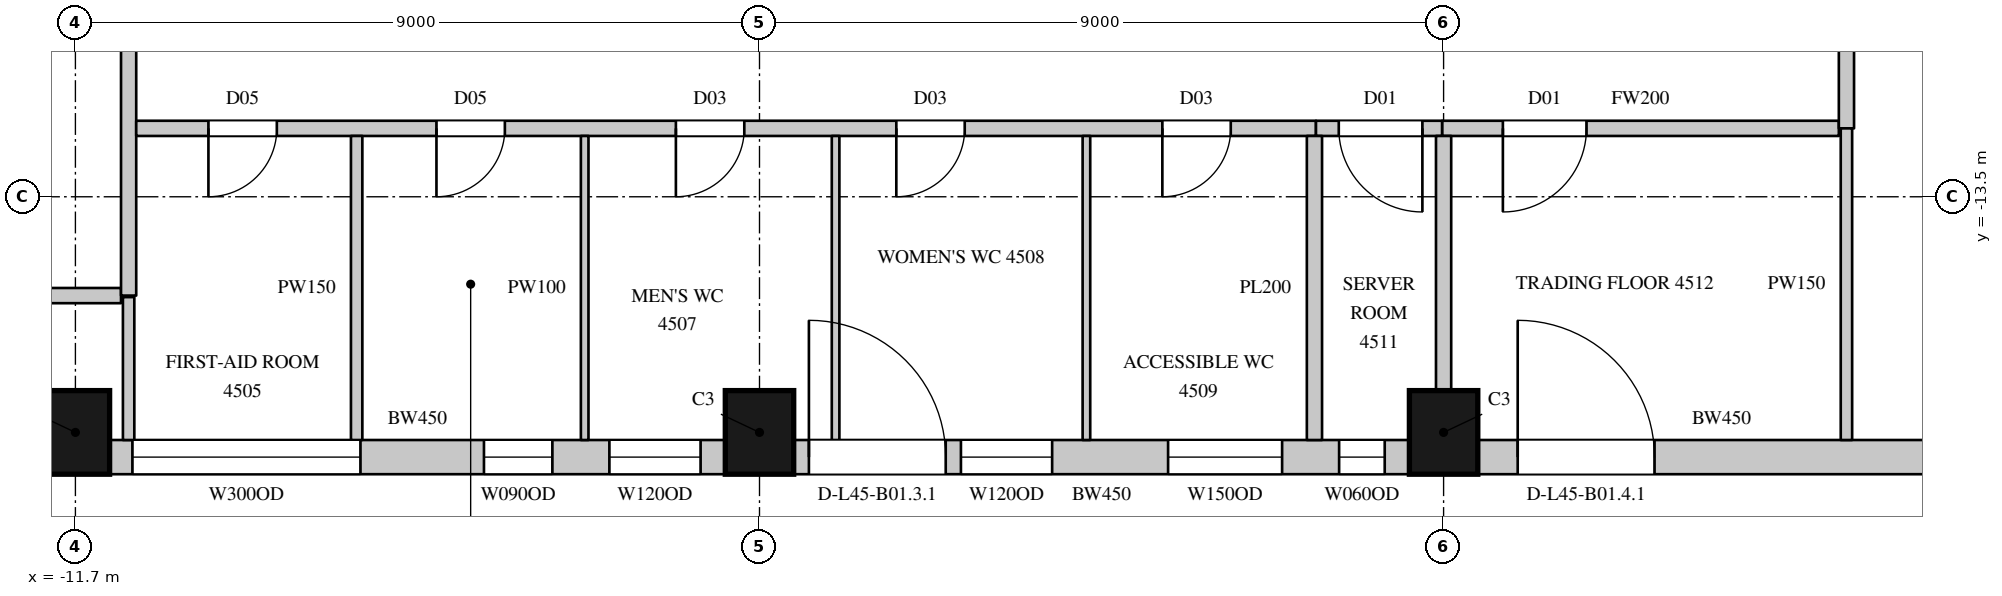
"""IFC4 building model, lengths in metres.
Left out: names, types, materials, properties, quantities, classifications, styles, units other than length and angle.
Written with IfcOpenShell. Run it as: python <this file> out.ifc"""

import sys

from ifc_helpers import new_model, si_unit, direction, frame, frame_2d, origin, origin_2d, place, context, subcontext, project, spatial, rectangle, extrude, element, fill, save


model = new_model("IFC4")
c1 = context("Model", 3, precision=1e-05, world=origin(), true_north=direction((0.0, 1.0)))
c2 = subcontext(c1, "Body", "Model", "MODEL_VIEW")
j1 = project(units=[si_unit("LENGTHUNIT", "METRE"), si_unit("PLANEANGLEUNIT", "RADIAN")], contexts=[c1])
p1 = place(None, origin())
s1 = spatial("IfcSite", under=j1, at=p1, CompositionType="ELEMENT")
p2 = place(p1, origin())
s2 = spatial("IfcBuilding", under=s1, at=p2, CompositionType="ELEMENT")
p3 = place(p2, frame((0.0, 0.0, 205.6)))
s3 = spatial("IfcBuildingStorey", under=s2, at=p3, CompositionType="ELEMENT", Elevation=205.6)
for number, where, z_axis, x_axis in (
    (1, (-11.7, -16.6, 0.0), (0.0, 0.0, 1.0), (1.0, 0.0, 0.0)),
    (2, (-2.7, -16.6, 0.0), (0.0, 0.0, 1.0), (1.0, 0.0, 0.0)),
    (3, (6.3, -16.6, 0.0), (0.0, 0.0, 1.0), (1.0, 0.0, 0.0)),
):
    element("IfcColumn", number, at=place(p3, frame(where, z_axis=z_axis, x_axis=x_axis)), inside=s3, PredefinedType="COLUMN", context=c2, shape_type="SweptSolid", body=[
        extrude(rectangle(XDim=0.9, YDim=1.1, at=origin_2d()), origin(), (0.0, 0.0, 1.0), 4.1),
    ])
p4 = place(p3, frame((-11.25, -16.925, 0.0), z_axis=(0.0, 0.0, 1.0), x_axis=(1.0, 0.0, 0.0)))
e4 = element("IfcWall", 4, at=p4, inside=s3, PredefinedType="SOLIDWALL", context=c2, shape_type="SweptSolid", body=[
    extrude(rectangle(XDim=8.1, YDim=0.45, at=frame_2d((4.05, 0.0))), origin(), (0.0, 0.0, 1.0), 3.8),
])
p5 = place(p4, frame((0.3, 0.0, 1.05)))
e5 = element("IfcOpeningElement", 5, at=p5, cuts=e4, PredefinedType="OPENING", context=c2, shape_type="SweptSolid", body=[
    extrude(rectangle(XDim=3.0, YDim=2.4, at=frame_2d((1.5, 1.2))), frame((0.0, 0.235, 0.0), z_axis=(0.0, -1.0, 0.0), x_axis=(1.0, 0.0, 0.0)), (0.0, 0.0, 1.0), 0.47),
])
p6 = place(p4, frame((4.925, 0.0, 1.05)))
e6 = element("IfcOpeningElement", 6, at=p6, cuts=e4, PredefinedType="OPENING", context=c2, shape_type="SweptSolid", body=[
    extrude(rectangle(XDim=0.9, YDim=2.4, at=frame_2d((0.45, 1.2))), frame((0.0, 0.235, 0.0), z_axis=(0.0, -1.0, 0.0), x_axis=(1.0, 0.0, 0.0)), (0.0, 0.0, 1.0), 0.47),
])
p7 = place(p4, frame((6.575, 0.0, 1.05)))
e7 = element("IfcOpeningElement", 7, at=p7, cuts=e4, PredefinedType="OPENING", context=c2, shape_type="SweptSolid", body=[
    extrude(rectangle(XDim=1.2, YDim=2.4, at=frame_2d((0.6, 1.2))), frame((0.0, 0.235, 0.0), z_axis=(0.0, -1.0, 0.0), x_axis=(1.0, 0.0, 0.0)), (0.0, 0.0, 1.0), 0.47),
])
p8 = place(p3, frame((-2.25, -16.925, 0.0), z_axis=(0.0, 0.0, 1.0), x_axis=(1.0, 0.0, 0.0)))
e8 = element("IfcWall", 8, at=p8, inside=s3, PredefinedType="SOLIDWALL", context=c2, shape_type="SweptSolid", body=[
    extrude(rectangle(XDim=8.1, YDim=0.45, at=frame_2d((4.05, 0.0))), origin(), (0.0, 0.0, 1.0), 3.8),
])
p9 = place(p8, frame((0.2, 0.0, 0.0)))
e9 = element("IfcOpeningElement", 9, at=p9, cuts=e8, PredefinedType="OPENING", context=c2, shape_type="SweptSolid", body=[
    extrude(rectangle(XDim=1.8, YDim=2.4, at=frame_2d((0.9, 1.2))), frame((0.0, 0.235, 0.0), z_axis=(0.0, -1.0, 0.0), x_axis=(1.0, 0.0, 0.0)), (0.0, 0.0, 1.0), 0.47),
])
p10 = place(p8, frame((2.2, 0.0, 1.05)))
e10 = element("IfcOpeningElement", 10, at=p10, cuts=e8, PredefinedType="OPENING", context=c2, shape_type="SweptSolid", body=[
    extrude(rectangle(XDim=1.2, YDim=2.4, at=frame_2d((0.6, 1.2))), frame((0.0, 0.235, 0.0), z_axis=(0.0, -1.0, 0.0), x_axis=(1.0, 0.0, 0.0)), (0.0, 0.0, 1.0), 0.47),
])
p11 = place(p8, frame((4.926, 0.0, 1.05)))
e11 = element("IfcOpeningElement", 11, at=p11, cuts=e8, PredefinedType="OPENING", context=c2, shape_type="SweptSolid", body=[
    extrude(rectangle(XDim=1.5, YDim=2.4, at=frame_2d((0.75, 1.2))), frame((0.0, 0.235, 0.0), z_axis=(0.0, -1.0, 0.0), x_axis=(1.0, 0.0, 0.0)), (0.0, 0.0, 1.0), 0.47),
])
p12 = place(p8, frame((7.176, 0.0, 1.05)))
e12 = element("IfcOpeningElement", 12, at=p12, cuts=e8, PredefinedType="OPENING", context=c2, shape_type="SweptSolid", body=[
    extrude(rectangle(XDim=0.6, YDim=2.4, at=frame_2d((0.3, 1.2))), frame((0.0, 0.235, 0.0), z_axis=(0.0, -1.0, 0.0), x_axis=(1.0, 0.0, 0.0)), (0.0, 0.0, 1.0), 0.47),
])
p13 = place(p3, frame((6.75, -16.925, 0.0), z_axis=(0.0, 0.0, 1.0), x_axis=(1.0, 0.0, 0.0)))
e13 = element("IfcWall", 13, at=p13, inside=s3, PredefinedType="SOLIDWALL", context=c2, shape_type="SweptSolid", body=[
    extrude(rectangle(XDim=6.414, YDim=0.45, at=frame_2d((3.207, 0.0))), origin(), (0.0, 0.0, 1.0), 3.8),
])
p14 = place(p13, frame((0.525, 0.0, 0.0)))
e14 = element("IfcOpeningElement", 14, at=p14, cuts=e13, PredefinedType="OPENING", context=c2, shape_type="SweptSolid", body=[
    extrude(rectangle(XDim=1.8, YDim=2.4, at=frame_2d((0.9, 1.2))), frame((0.0, 0.235, 0.0), z_axis=(0.0, -1.0, 0.0), x_axis=(1.0, 0.0, 0.0)), (0.0, 0.0, 1.0), 0.47),
])
p15 = place(p3, frame((-13.97, -14.8, 0.0), z_axis=(0.0, 0.0, 1.0), x_axis=(1.0, 0.0, 0.0)))
e15 = element("IfcWall", 15, at=p15, inside=s3, PredefinedType="PARTITIONING", context=c2, shape_type="SweptSolid", body=[
    extrude(rectangle(XDim=2.87, YDim=0.2, at=frame_2d((1.435, 0.0))), origin(), (0.0, 0.0, 1.0), 3.8),
])
p16 = place(p3, frame((-11.0, -14.8, 0.0), z_axis=(0.0, 0.0, 1.0), x_axis=(0.0, 1.0, 0.0)))
e16 = element("IfcWall", 16, at=p16, inside=s3, PredefinedType="PARTITIONING", context=c2, shape_type="SweptSolid", body=[
    extrude(rectangle(XDim=29.6, YDim=0.2, at=frame_2d((14.8, 0.0))), origin(), (0.0, 0.0, 1.0), 3.8),
])
p17 = place(p16, frame((14.05, 0.0, 0.0)))
e17 = element("IfcOpeningElement", 17, at=p17, cuts=e16, PredefinedType="OPENING", context=c2, shape_type="SweptSolid", body=[
    extrude(rectangle(XDim=1.5, YDim=2.4, at=frame_2d((0.75, 1.2))), frame((0.0, 0.11, 0.0), z_axis=(0.0, -1.0, 0.0), x_axis=(1.0, 0.0, 0.0)), (0.0, 0.0, 1.0), 0.22),
])
p18 = place(p3, frame((-10.9, -12.6, 0.0), z_axis=(0.0, 0.0, 1.0), x_axis=(1.0, 0.0, 0.0)))
e18 = element("IfcWall", 18, at=p18, inside=s3, PredefinedType="PARTITIONING", context=c2, shape_type="SweptSolid", body=[
    extrude(rectangle(XDim=15.521, YDim=0.2, at=frame_2d((7.76, 0.0))), origin(), (0.0, 0.0, 1.0), 3.8),
])
p19 = place(p18, frame((0.95, 0.0, 0.0)))
e19 = element("IfcOpeningElement", 19, at=p19, cuts=e18, PredefinedType="OPENING", context=c2, shape_type="SweptSolid", body=[
    extrude(rectangle(XDim=0.9, YDim=2.2, at=frame_2d((0.45, 1.1))), frame((0.0, 0.11, 0.0), z_axis=(0.0, -1.0, 0.0), x_axis=(1.0, 0.0, 0.0)), (0.0, 0.0, 1.0), 0.22),
])
p20 = place(p18, frame((3.95, 0.0, 0.0)))
e20 = element("IfcOpeningElement", 20, at=p20, cuts=e18, PredefinedType="OPENING", context=c2, shape_type="SweptSolid", body=[
    extrude(rectangle(XDim=0.9, YDim=2.2, at=frame_2d((0.45, 1.1))), frame((0.0, 0.11, 0.0), z_axis=(0.0, -1.0, 0.0), x_axis=(1.0, 0.0, 0.0)), (0.0, 0.0, 1.0), 0.22),
])
p21 = place(p18, frame((7.1, 0.0, 0.0)))
e21 = element("IfcOpeningElement", 21, at=p21, cuts=e18, PredefinedType="OPENING", context=c2, shape_type="SweptSolid", body=[
    extrude(rectangle(XDim=0.9, YDim=2.2, at=frame_2d((0.45, 1.1))), frame((0.0, 0.11, 0.0), z_axis=(0.0, -1.0, 0.0), x_axis=(1.0, 0.0, 0.0)), (0.0, 0.0, 1.0), 0.22),
])
p22 = place(p18, frame((10.0, 0.0, 0.0)))
e22 = element("IfcOpeningElement", 22, at=p22, cuts=e18, PredefinedType="OPENING", context=c2, shape_type="SweptSolid", body=[
    extrude(rectangle(XDim=0.9, YDim=2.2, at=frame_2d((0.45, 1.1))), frame((0.0, 0.11, 0.0), z_axis=(0.0, -1.0, 0.0), x_axis=(1.0, 0.0, 0.0)), (0.0, 0.0, 1.0), 0.22),
])
p23 = place(p18, frame((13.5, 0.0, 0.0)))
e23 = element("IfcOpeningElement", 23, at=p23, cuts=e18, PredefinedType="OPENING", context=c2, shape_type="SweptSolid", body=[
    extrude(rectangle(XDim=0.9, YDim=2.2, at=frame_2d((0.45, 1.1))), frame((0.0, 0.11, 0.0), z_axis=(0.0, -1.0, 0.0), x_axis=(1.0, 0.0, 0.0)), (0.0, 0.0, 1.0), 0.22),
])
p24 = place(p3, frame((6.28, -12.6, 0.0), z_axis=(0.0, 0.0, 1.0), x_axis=(1.0, 0.0, 0.0)))
e24 = element("IfcWall", 24, at=p24, inside=s3, PredefinedType="PARTITIONING", context=c2, shape_type="SweptSolid", body=[
    extrude(rectangle(XDim=5.22, YDim=0.2, at=frame_2d((2.61, 0.0))), origin(), (0.0, 0.0, 1.0), 3.8),
])
p25 = place(p24, frame((0.8, 0.0, 0.0)))
e25 = element("IfcOpeningElement", 25, at=p25, cuts=e24, PredefinedType="OPENING", context=c2, shape_type="SweptSolid", body=[
    extrude(rectangle(XDim=1.1, YDim=2.4, at=frame_2d((0.55, 1.2))), frame((0.0, 0.11, 0.0), z_axis=(0.0, -1.0, 0.0), x_axis=(1.0, 0.0, 0.0)), (0.0, 0.0, 1.0), 0.22),
])
p26 = place(p3, frame((11.6, -12.6, 0.0), z_axis=(0.0, 0.0, 1.0), x_axis=(0.0, 1.0, 0.0)))
e26 = element("IfcWall", 26, at=p26, inside=s3, PredefinedType="PARTITIONING", context=c2, shape_type="SweptSolid", body=[
    extrude(rectangle(XDim=25.1, YDim=0.2, at=frame_2d((12.55, 0.0))), origin(), (0.0, 0.0, 1.0), 3.8),
])
p27 = place(p26, frame((10.45, 0.0, 0.0)))
e27 = element("IfcOpeningElement", 27, at=p27, cuts=e26, PredefinedType="OPENING", context=c2, shape_type="SweptSolid", body=[
    extrude(rectangle(XDim=1.5, YDim=2.4, at=frame_2d((0.75, 1.2))), frame((0.0, 0.11, 0.0), z_axis=(0.0, -1.0, 0.0), x_axis=(1.0, 0.0, 0.0)), (0.0, 0.0, 1.0), 0.22),
])
p28 = place(p26, frame((3.45, 0.0, 0.0)))
e28 = element("IfcOpeningElement", 28, at=p28, cuts=e26, PredefinedType="OPENING", context=c2, shape_type="SweptSolid", body=[
    extrude(rectangle(XDim=1.1, YDim=2.4, at=frame_2d((0.55, 1.2))), frame((0.0, 0.11, 0.0), z_axis=(0.0, -1.0, 0.0), x_axis=(1.0, 0.0, 0.0)), (0.0, 0.0, 1.0), 0.22),
])
p29 = place(p3, frame((-11.0, -16.7, 0.0), z_axis=(0.0, 0.0, 1.0), x_axis=(0.0, 1.0, 0.0)))
e29 = element("IfcWall", 29, at=p29, inside=s3, PredefinedType="PARTITIONING", context=c2, shape_type="SweptSolid", body=[
    extrude(rectangle(XDim=1.88, YDim=0.15, at=frame_2d((0.94, 0.0))), origin(), (0.0, 0.0, 1.0), 3.8),
])
p30 = place(p3, frame((-8.0, -16.7, 0.0), z_axis=(0.0, 0.0, 1.0), x_axis=(0.0, 1.0, 0.0)))
e30 = element("IfcWall", 30, at=p30, inside=s3, PredefinedType="PARTITIONING", context=c2, shape_type="SweptSolid", body=[
    extrude(rectangle(XDim=4.0, YDim=0.15, at=frame_2d((2.0, 0.0))), origin(), (0.0, 0.0, 1.0), 3.8),
])
p31 = place(p3, frame((11.6, -16.7, 0.0), z_axis=(0.0, 0.0, 1.0), x_axis=(0.0, 1.0, 0.0)))
e31 = element("IfcWall", 31, at=p31, inside=s3, PredefinedType="PARTITIONING", context=c2, shape_type="SweptSolid", body=[
    extrude(rectangle(XDim=4.1, YDim=0.15, at=frame_2d((2.05, 0.0))), origin(), (0.0, 0.0, 1.0), 3.8),
])
p32 = place(p3, frame((4.621, -12.6, 0.0), z_axis=(0.0, 0.0, 1.0), x_axis=(1.0, 0.0, 0.0)))
e32 = element("IfcWall", 32, at=p32, inside=s3, PredefinedType="PARTITIONING", context=c2, shape_type="SweptSolid", body=[
    extrude(rectangle(XDim=1.659, YDim=0.2, at=frame_2d((0.83, 0.0))), origin(), (0.0, 0.0, 1.0), 3.8),
])
p33 = place(p32, frame((0.3, 0.0, 0.0)))
e33 = element("IfcOpeningElement", 33, at=p33, cuts=e32, PredefinedType="OPENING", context=c2, shape_type="SweptSolid", body=[
    extrude(rectangle(XDim=1.1, YDim=2.4, at=frame_2d((0.55, 1.2))), frame((0.0, 0.11, 0.0), z_axis=(0.0, -1.0, 0.0), x_axis=(1.0, 0.0, 0.0)), (0.0, 0.0, 1.0), 0.22),
])
p34 = place(p3, frame((4.601, -16.7, 0.0), z_axis=(0.0, 0.0, 1.0), x_axis=(0.0, 1.0, 0.0)))
e34 = element("IfcWall", 34, at=p34, inside=s3, PredefinedType="PARTITIONING", context=c2, shape_type="SweptSolid", body=[
    extrude(rectangle(XDim=4.0, YDim=0.2, at=frame_2d((2.0, 0.0))), origin(), (0.0, 0.0, 1.0), 3.8),
])
p35 = place(p3, frame((6.3, -16.05, 0.0), z_axis=(0.0, 0.0, 1.0), x_axis=(0.0, 1.0, 0.0)))
e35 = element("IfcWall", 35, at=p35, inside=s3, PredefinedType="PARTITIONING", context=c2, shape_type="SweptSolid", body=[
    extrude(rectangle(XDim=3.35, YDim=0.2, at=frame_2d((1.675, 0.0))), origin(), (0.0, 0.0, 1.0), 3.25),
])
for number, where, z_axis, x_axis in (
    (36, (-5.0, -16.7, 0.0), (0.0, 0.0, 1.0), (0.0, 1.0, 0.0)),
    (37, (-1.699, -16.7, 0.0), (0.0, 0.0, 1.0), (0.0, 1.0, 0.0)),
):
    element("IfcWall", number, at=place(p3, frame(where, z_axis=z_axis, x_axis=x_axis)), inside=s3, PredefinedType="PARTITIONING", context=c2, shape_type="SweptSolid", body=[
        extrude(rectangle(XDim=4.0, YDim=0.1, at=frame_2d((2.0, 0.0))), origin(), (0.0, 0.0, 1.0), 3.8),
    ])
p36 = place(p3, frame((1.601, -16.7, 0.0), z_axis=(0.0, 0.0, 1.0), x_axis=(0.0, 1.0, 0.0)))
e38 = element("IfcWall", 38, at=p36, inside=s3, PredefinedType="PARTITIONING", context=c2, shape_type="SweptSolid", body=[
    extrude(rectangle(XDim=4.0, YDim=0.1, at=frame_2d((2.0, 0.0))), origin(), (0.0, 0.0, 1.0), 3.15),
])
p37 = place(p5, origin())
e39 = element("IfcWindow", 39, at=p37, inside=s3, PartitioningType="SINGLE_PANEL", PredefinedType="WINDOW", context=c2, shape_type="SweptSolid", body=[
    extrude(rectangle(XDim=3.0, YDim=2.4, at=frame_2d((1.5, 1.2))), frame((0.0, 0.135, 0.0), z_axis=(0.0, -1.0, 0.0), x_axis=(1.0, 0.0, 0.0)), (0.0, 0.0, 1.0), 0.06),
])
fill(e5, e39)
p38 = place(p9, origin())
e40 = element("IfcDoor", 40, at=p38, inside=s3, OperationType="SLIDING_TO_LEFT", PredefinedType="DOOR", context=c2, shape_type="SweptSolid", body=[
    extrude(rectangle(XDim=1.8, YDim=2.4, at=frame_2d((0.9, 1.2))), frame((0.0, 0.13, 0.0), z_axis=(0.0, -1.0, 0.0), x_axis=(1.0, 0.0, 0.0)), (0.0, 0.0, 1.0), 0.05),
])
fill(e9, e40)
p39 = place(p10, origin())
e41 = element("IfcWindow", 41, at=p39, inside=s3, PartitioningType="SINGLE_PANEL", PredefinedType="WINDOW", context=c2, shape_type="SweptSolid", body=[
    extrude(rectangle(XDim=1.2, YDim=2.4, at=frame_2d((0.6, 1.2))), frame((0.0, 0.135, 0.0), z_axis=(0.0, -1.0, 0.0), x_axis=(1.0, 0.0, 0.0)), (0.0, 0.0, 1.0), 0.06),
])
fill(e10, e41)
p40 = place(p14, origin())
e42 = element("IfcDoor", 42, at=p40, inside=s3, OperationType="SLIDING_TO_LEFT", PredefinedType="DOOR", context=c2, shape_type="SweptSolid", body=[
    extrude(rectangle(XDim=1.8, YDim=2.4, at=frame_2d((0.9, 1.2))), frame((0.0, 0.13, 0.0), z_axis=(0.0, -1.0, 0.0), x_axis=(1.0, 0.0, 0.0)), (0.0, 0.0, 1.0), 0.05),
])
fill(e14, e42)
p41 = place(p19, origin())
e43 = element("IfcDoor", 43, at=p41, inside=s3, OperationType="SINGLE_SWING_RIGHT", PredefinedType="DOOR", context=c2, shape_type="SweptSolid", body=[
    extrude(rectangle(XDim=0.9, YDim=2.2, at=frame_2d((0.45, 1.1))), frame((0.0, 0.025, 0.0), z_axis=(0.0, -1.0, 0.0), x_axis=(1.0, 0.0, 0.0)), (0.0, 0.0, 1.0), 0.05),
])
fill(e19, e43)
p42 = place(p20, origin())
e44 = element("IfcDoor", 44, at=p42, inside=s3, OperationType="SINGLE_SWING_RIGHT", PredefinedType="DOOR", context=c2, shape_type="SweptSolid", body=[
    extrude(rectangle(XDim=0.9, YDim=2.2, at=frame_2d((0.45, 1.1))), frame((0.0, 0.025, 0.0), z_axis=(0.0, -1.0, 0.0), x_axis=(1.0, 0.0, 0.0)), (0.0, 0.0, 1.0), 0.05),
])
fill(e20, e44)
p43 = place(p21, origin())
e45 = element("IfcDoor", 45, at=p43, inside=s3, OperationType="SINGLE_SWING_RIGHT", PredefinedType="DOOR", context=c2, shape_type="SweptSolid", body=[
    extrude(rectangle(XDim=0.9, YDim=2.2, at=frame_2d((0.45, 1.1))), frame((0.0, 0.025, 0.0), z_axis=(0.0, -1.0, 0.0), x_axis=(1.0, 0.0, 0.0)), (0.0, 0.0, 1.0), 0.05),
])
fill(e21, e45)
p44 = place(p22, origin())
e46 = element("IfcDoor", 46, at=p44, inside=s3, OperationType="SINGLE_SWING_RIGHT", PredefinedType="DOOR", context=c2, shape_type="SweptSolid", body=[
    extrude(rectangle(XDim=0.9, YDim=2.2, at=frame_2d((0.45, 1.1))), frame((0.0, 0.025, 0.0), z_axis=(0.0, -1.0, 0.0), x_axis=(1.0, 0.0, 0.0)), (0.0, 0.0, 1.0), 0.05),
])
fill(e22, e46)
p45 = place(p23, origin())
e47 = element("IfcDoor", 47, at=p45, inside=s3, OperationType="SINGLE_SWING_RIGHT", PredefinedType="DOOR", context=c2, shape_type="SweptSolid", body=[
    extrude(rectangle(XDim=0.9, YDim=2.2, at=frame_2d((0.45, 1.1))), frame((0.0, 0.025, 0.0), z_axis=(0.0, -1.0, 0.0), x_axis=(1.0, 0.0, 0.0)), (0.0, 0.0, 1.0), 0.05),
])
fill(e23, e47)
p46 = place(p33, origin())
e48 = element("IfcDoor", 48, at=p46, inside=s3, OperationType="SINGLE_SWING_LEFT", PredefinedType="DOOR", context=c2, shape_type="SweptSolid", body=[
    extrude(rectangle(XDim=1.1, YDim=2.4, at=frame_2d((0.55, 1.2))), frame((0.0, 0.025, 0.0), z_axis=(0.0, -1.0, 0.0), x_axis=(1.0, 0.0, 0.0)), (0.0, 0.0, 1.0), 0.05),
])
fill(e33, e48)
p47 = place(p25, origin())
e49 = element("IfcDoor", 49, at=p47, inside=s3, OperationType="SINGLE_SWING_RIGHT", PredefinedType="DOOR", context=c2, shape_type="SweptSolid", body=[
    extrude(rectangle(XDim=1.1, YDim=2.4, at=frame_2d((0.55, 1.2))), frame((0.0, 0.025, 0.0), z_axis=(0.0, -1.0, 0.0), x_axis=(1.0, 0.0, 0.0)), (0.0, 0.0, 1.0), 0.05),
])
fill(e25, e49)
p48 = place(p6, origin())
e50 = element("IfcWindow", 50, at=p48, inside=s3, PartitioningType="SINGLE_PANEL", PredefinedType="WINDOW", context=c2, shape_type="SweptSolid", body=[
    extrude(rectangle(XDim=0.9, YDim=2.4, at=frame_2d((0.45, 1.2))), frame((0.0, 0.135, 0.0), z_axis=(0.0, -1.0, 0.0), x_axis=(1.0, 0.0, 0.0)), (0.0, 0.0, 1.0), 0.06),
])
fill(e6, e50)
p49 = place(p7, origin())
e51 = element("IfcWindow", 51, at=p49, inside=s3, PartitioningType="SINGLE_PANEL", PredefinedType="WINDOW", context=c2, shape_type="SweptSolid", body=[
    extrude(rectangle(XDim=1.2, YDim=2.4, at=frame_2d((0.6, 1.2))), frame((0.0, 0.135, 0.0), z_axis=(0.0, -1.0, 0.0), x_axis=(1.0, 0.0, 0.0)), (0.0, 0.0, 1.0), 0.06),
])
fill(e7, e51)
p50 = place(p11, origin())
e52 = element("IfcWindow", 52, at=p50, inside=s3, PartitioningType="SINGLE_PANEL", PredefinedType="WINDOW", context=c2, shape_type="SweptSolid", body=[
    extrude(rectangle(XDim=1.5, YDim=2.4, at=frame_2d((0.75, 1.2))), frame((0.0, 0.135, 0.0), z_axis=(0.0, -1.0, 0.0), x_axis=(1.0, 0.0, 0.0)), (0.0, 0.0, 1.0), 0.06),
])
fill(e11, e52)
p51 = place(p12, origin())
e53 = element("IfcWindow", 53, at=p51, inside=s3, PartitioningType="SINGLE_PANEL", PredefinedType="WINDOW", context=c2, shape_type="SweptSolid", body=[
    extrude(rectangle(XDim=0.6, YDim=2.4, at=frame_2d((0.3, 1.2))), frame((0.0, 0.135, 0.0), z_axis=(0.0, -1.0, 0.0), x_axis=(1.0, 0.0, 0.0)), (0.0, 0.0, 1.0), 0.06),
])
fill(e12, e53)
save(model, sys.argv[1])
